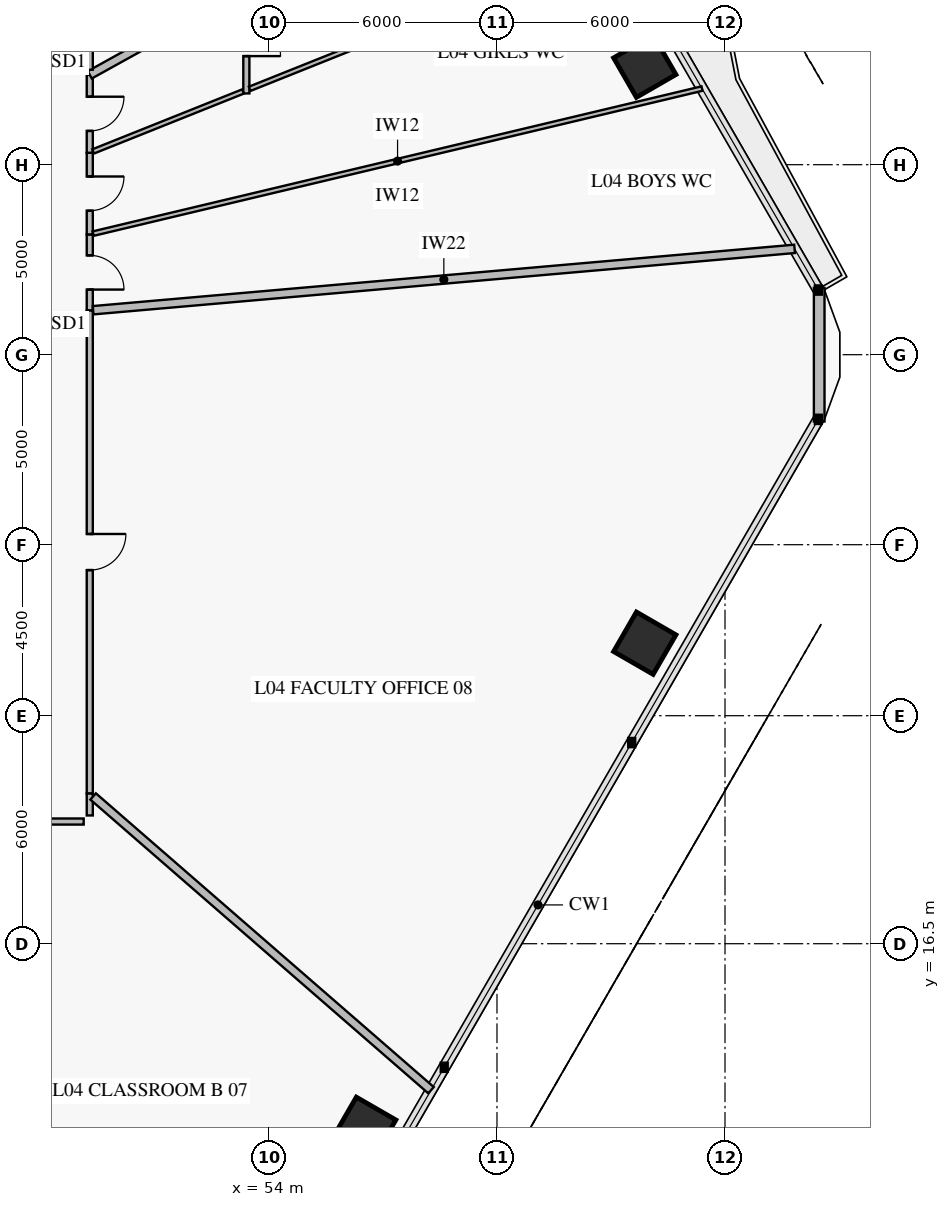
"""IFC4 building model, lengths in metres.
Left out: names, types, materials, properties, quantities, classifications, styles, units other than length and angle.
Written with IfcOpenShell. Run it as: python <this file> out.ifc"""

import sys

from ifc_helpers import new_model, si_unit, direction, frame, frame_2d, origin, origin_2d, place, context, subcontext, project, spatial, rectangle, extrude, element, fill, save


model = new_model("IFC4")
c1 = context("Model", 3, precision=1e-05, world=origin(), true_north=direction((0.0, 1.0)))
c2 = subcontext(c1, "Body", "Model", "MODEL_VIEW")
j1 = project(units=[si_unit("LENGTHUNIT", "METRE"), si_unit("PLANEANGLEUNIT", "RADIAN")], contexts=[c1])
p1 = place(None, origin())
s1 = spatial("IfcSite", under=j1, at=p1, CompositionType="ELEMENT")
p2 = place(p1, origin())
s2 = spatial("IfcBuilding", under=s1, at=p2, CompositionType="ELEMENT")
p3 = place(p2, frame((0.0, 0.0, 16.2)))
s3 = spatial("IfcBuildingStorey", under=s2, at=p3, CompositionType="ELEMENT", Elevation=16.2)
for number, where, z_axis, x_axis in (
    (1, (63.889, 39.592, 0.0), (0.0, 0.0, 1.0), (-0.5, 0.866, 0.0)),
    (2, (56.519, 11.643, 0.0), (0.0, 0.0, 1.0), (0.5, 0.866, 0.0)),
    (3, (63.889, 24.408, 0.0), (0.0, 0.0, 1.0), (0.5, 0.866, 0.0)),
):
    element("IfcColumn", number, at=place(p3, frame(where, z_axis=z_axis, x_axis=x_axis)), inside=s3, PredefinedType="COLUMN", context=c2, shape_type="SweptSolid", body=[
        extrude(rectangle(XDim=1.2, YDim=1.2, at=origin_2d()), origin(), (0.0, 0.0, 1.0), 3.92),
    ])
p4 = place(p3, frame((68.479, 33.758, 0.0), z_axis=(0.0, 0.0, 1.0), x_axis=(0.0, -1.0, 0.0)))
e4 = element("IfcWall", 4, at=p4, inside=s3, PredefinedType="SOLIDWALL", context=c2, shape_type="SweptSolid", body=[
    extrude(rectangle(XDim=3.515, YDim=0.28, at=frame_2d((1.758, 0.0))), origin(), (0.0, 0.0, 1.0), 3.92),
])
p5 = place(p3, frame((49.285, 33.162, 0.0), z_axis=(0.0, 0.0, 1.0), x_axis=(0.0, 1.0, 0.0)))
e5 = element("IfcWall", 5, at=p5, inside=s3, PredefinedType="PARTITIONING", context=c2, shape_type="SweptSolid", body=[
    extrude(rectangle(XDim=2.002, YDim=0.16, at=frame_2d((1.001, 0.0))), origin(), (0.0, 0.0, 1.0), 3.92),
])
p6 = place(p5, frame((0.551, 0.0, 0.0)))
e6 = element("IfcOpeningElement", 6, at=p6, cuts=e5, PredefinedType="OPENING", context=c2, shape_type="SweptSolid", body=[
    extrude(rectangle(XDim=0.9, YDim=2.1, at=frame_2d((0.45, 1.05))), frame((0.0, 0.092, 0.0), z_axis=(0.0, -1.0, 0.0), x_axis=(1.0, 0.0, 0.0)), (0.0, 0.0, 1.0), 0.184),
])
p7 = place(p3, frame((49.285, 35.165, 0.0), z_axis=(0.0, 0.0, 1.0), x_axis=(0.0, 1.0, 0.0)))
e7 = element("IfcWall", 7, at=p7, inside=s3, PredefinedType="PARTITIONING", context=c2, shape_type="SweptSolid", body=[
    extrude(rectangle(XDim=2.149, YDim=0.16, at=frame_2d((1.074, 0.0))), origin(), (0.0, 0.0, 1.0), 3.22),
])
p8 = place(p7, frame((0.624, 0.0, 0.0)))
e8 = element("IfcOpeningElement", 8, at=p8, cuts=e7, PredefinedType="OPENING", context=c2, shape_type="SweptSolid", body=[
    extrude(rectangle(XDim=0.9, YDim=2.1, at=frame_2d((0.45, 1.05))), frame((0.0, 0.092, 0.0), z_axis=(0.0, -1.0, 0.0), x_axis=(1.0, 0.0, 0.0)), (0.0, 0.0, 1.0), 0.184),
])
p9 = place(p3, frame((53.405, 41.739, 0.0), z_axis=(0.0, 0.0, 1.0), x_axis=(0.0, -1.0, 0.0)))
e9 = element("IfcWall", 9, at=p9, inside=s3, PredefinedType="PARTITIONING", context=c2, shape_type="SweptSolid", body=[
    extrude(rectangle(XDim=2.864, YDim=0.16, at=frame_2d((1.432, 0.0))), origin(), (0.0, 0.0, 1.0), 3.92),
])
p10 = place(p9, frame((0.982, 0.0, 0.0)))
e10 = element("IfcOpeningElement", 10, at=p10, cuts=e9, PredefinedType="OPENING", context=c2, shape_type="SweptSolid", body=[
    extrude(rectangle(XDim=0.9, YDim=2.1, at=frame_2d((0.45, 1.05))), frame((0.0, 0.092, 0.0), z_axis=(0.0, -1.0, 0.0), x_axis=(1.0, 0.0, 0.0)), (0.0, 0.0, 1.0), 0.184),
])
p11 = place(p3, frame((49.285, 37.314, 0.0), z_axis=(0.0, 0.0, 1.0), x_axis=(0.0, 1.0, 0.0)))
e11 = element("IfcWall", 11, at=p11, inside=s3, PredefinedType="PARTITIONING", context=c2, shape_type="SweptSolid", body=[
    extrude(rectangle(XDim=2.05, YDim=0.16, at=frame_2d((1.025, 0.0))), origin(), (0.0, 0.0, 1.0), 3.92),
])
p12 = place(p11, frame((0.575, 0.0, 0.0)))
e12 = element("IfcOpeningElement", 12, at=p12, cuts=e11, PredefinedType="OPENING", context=c2, shape_type="SweptSolid", body=[
    extrude(rectangle(XDim=0.9, YDim=2.1, at=frame_2d((0.45, 1.05))), frame((0.0, 0.092, 0.0), z_axis=(0.0, -1.0, 0.0), x_axis=(1.0, 0.0, 0.0)), (0.0, 0.0, 1.0), 0.184),
])
p13 = place(p3, frame((41.992, 19.715, 0.0), z_axis=(0.0, 0.0, 1.0), x_axis=(1.0, 0.0, 0.0)))
e13 = element("IfcWall", 13, at=p13, inside=s3, PredefinedType="PARTITIONING", context=c2, shape_type="SweptSolid", body=[
    extrude(rectangle(XDim=7.133, YDim=0.16, at=frame_2d((3.567, 0.0))), origin(), (0.0, 0.0, 1.0), 3.22),
])
p14 = place(p13, frame((2.992, 0.0, 0.0)))
e14 = element("IfcOpeningElement", 14, at=p14, cuts=e13, PredefinedType="OPENING", context=c2, shape_type="SweptSolid", body=[
    extrude(rectangle(XDim=1.15, YDim=2.2, at=frame_2d((0.575, 1.1))), frame((0.0, 0.092, 0.0), z_axis=(0.0, -1.0, 0.0), x_axis=(1.0, 0.0, 0.0)), (0.0, 0.0, 1.0), 0.184),
])
p15 = place(p3, frame((49.285, 20.451, 0.0), z_axis=(0.0, 0.0, 1.0), x_axis=(0.0, 1.0, 0.0)))
e15 = element("IfcWall", 15, at=p15, inside=s3, PredefinedType="PARTITIONING", context=c2, shape_type="SweptSolid", body=[
    extrude(rectangle(XDim=12.711, YDim=0.16, at=frame_2d((6.355, 0.0))), origin(), (0.0, 0.0, 1.0), 3.22),
])
p16 = place(p15, frame((5.88, 0.0, 0.0)))
e16 = element("IfcOpeningElement", 16, at=p16, cuts=e15, PredefinedType="OPENING", context=c2, shape_type="SweptSolid", body=[
    extrude(rectangle(XDim=0.95, YDim=2.1, at=frame_2d((0.475, 1.05))), frame((0.0, 0.092, 0.0), z_axis=(0.0, -1.0, 0.0), x_axis=(1.0, 0.0, 0.0)), (0.0, 0.0, 1.0), 0.184),
])
p17 = place(p3, frame((49.373, 33.17, 0.0), z_axis=(0.0, 0.0, 1.0), x_axis=(0.99619391773, 0.087164661858, 0.0)))
e17 = element("IfcWall", 17, at=p17, inside=s3, PredefinedType="PARTITIONING", context=c2, shape_type="SweptSolid", body=[
    extrude(rectangle(XDim=18.528, YDim=0.22, at=frame_2d((9.264, 0.0))), origin(), (0.0, 0.0, 1.0), 3.17),
])
p18 = place(p3, frame((49.373, 35.186, 0.0), z_axis=(0.0, 0.0, 1.0), x_axis=(0.972774396977, 0.231754120968, 0.0)))
e18 = element("IfcWall", 18, at=p18, inside=s3, PredefinedType="PARTITIONING", context=c2, shape_type="SweptSolid", body=[
    extrude(rectangle(XDim=16.471, YDim=0.12, at=frame_2d((8.235, 0.0))), origin(), (0.0, 0.0, 1.0), 3.17),
])
p19 = place(p3, frame((49.373, 37.349, 0.0), z_axis=(0.0, 0.0, 1.0), x_axis=(0.928488582268, 0.371360946517, 0.0)))
e19 = element("IfcWall", 19, at=p19, inside=s3, PredefinedType="PARTITIONING", context=c2, shape_type="SweptSolid", body=[
    extrude(rectangle(XDim=4.248, YDim=0.12, at=frame_2d((2.124, 0.0))), origin(), (0.0, 0.0, 1.0), 3.92),
])
p20 = place(p3, frame((53.493, 38.997, 0.0), z_axis=(0.0, 0.0, 1.0), x_axis=(0.928486388213, 0.371366432117, 0.0)))
e20 = element("IfcWall", 20, at=p20, inside=s3, PredefinedType="PARTITIONING", context=c2, shape_type="SweptSolid", body=[
    extrude(rectangle(XDim=10.417, YDim=0.12, at=frame_2d((5.208, 0.0))), origin(), (0.0, 0.0, 1.0), 3.17),
])
p21 = place(p3, frame((49.285, 39.364, 0.0), z_axis=(0.0, 0.0, 1.0), x_axis=(0.874606547494, 0.484833360115, 0.0)))
e21 = element("IfcWall", 21, at=p21, inside=s3, PredefinedType="PARTITIONING", context=c2, shape_type="SweptSolid", body=[
    extrude(rectangle(XDim=4.61, YDim=0.22, at=frame_2d((2.305, 0.0))), origin(), (0.0, 0.0, 1.0), 3.92),
])
p22 = place(p3, frame((49.285, 39.499, 0.0), z_axis=(0.0, 0.0, 1.0), x_axis=(0.0, 1.0, 0.0)))
e22 = element("IfcWall", 22, at=p22, inside=s3, PredefinedType="PARTITIONING", context=c2, shape_type="SweptSolid", body=[
    extrude(rectangle(XDim=4.626, YDim=0.16, at=frame_2d((2.313, 0.0))), origin(), (0.0, 0.0, 1.0), 3.92),
])
p23 = place(p3, frame((42.035, 19.627, 0.0), z_axis=(0.0, 0.0, 1.0), x_axis=(0.438375147569, -0.898792094977, 0.0)))
e23 = element("IfcWall", 23, at=p23, inside=s3, PredefinedType="PARTITIONING", context=c2, shape_type="SweptSolid", body=[
    extrude(rectangle(XDim=18.453, YDim=0.22, at=frame_2d((9.227, 0.0))), origin(), (0.0, 0.0, 1.0), 3.17),
])
p24 = place(p3, frame((49.285, 19.875, 0.0), z_axis=(0.0, 0.0, 1.0), x_axis=(0.0, 1.0, 0.0)))
e24 = element("IfcWall", 24, at=p24, inside=s3, PredefinedType="PARTITIONING", context=c2, shape_type="SweptSolid", body=[
    extrude(rectangle(XDim=0.576, YDim=0.16, at=frame_2d((0.288, 0.0))), origin(), (0.0, 0.0, 1.0), 3.92),
])
p25 = place(p3, frame((49.373, 20.375, 0.0), z_axis=(0.0, 0.0, 1.0), x_axis=(0.754715261602, -0.656052493254, 0.0)))
e25 = element("IfcWall", 25, at=p25, inside=s3, PredefinedType="PARTITIONING", context=c2, shape_type="SweptSolid", body=[
    extrude(rectangle(XDim=11.781, YDim=0.22, at=frame_2d((5.891, 0.0))), origin(), (0.0, 0.0, 1.0), 3.17),
])
p26 = place(p6, frame((0.9, 0.0, 0.0), z_axis=(0.0, 0.0, 1.0), x_axis=(-1.0, 0.0, 0.0)))
e26 = element("IfcDoor", 26, at=p26, inside=s3, OperationType="SINGLE_SWING_RIGHT", PredefinedType="DOOR", context=c2, shape_type="SweptSolid", body=[
    extrude(rectangle(XDim=0.9, YDim=2.1, at=frame_2d((0.45, 1.05))), frame((0.0, 0.025, 0.0), z_axis=(0.0, -1.0, 0.0), x_axis=(1.0, 0.0, 0.0)), (0.0, 0.0, 1.0), 0.05),
])
fill(e6, e26)
p27 = place(p8, frame((0.9, 0.0, 0.0), z_axis=(0.0, 0.0, 1.0), x_axis=(-1.0, 0.0, 0.0)))
e27 = element("IfcDoor", 27, at=p27, inside=s3, OperationType="SINGLE_SWING_LEFT", PredefinedType="DOOR", context=c2, shape_type="SweptSolid", body=[
    extrude(rectangle(XDim=0.9, YDim=2.1, at=frame_2d((0.45, 1.05))), frame((0.0, 0.025, 0.0), z_axis=(0.0, -1.0, 0.0), x_axis=(1.0, 0.0, 0.0)), (0.0, 0.0, 1.0), 0.05),
])
fill(e8, e27)
p28 = place(p10, origin())
e28 = element("IfcDoor", 28, at=p28, inside=s3, OperationType="SINGLE_SWING_RIGHT", PredefinedType="DOOR", context=c2, shape_type="SweptSolid", body=[
    extrude(rectangle(XDim=0.9, YDim=2.1, at=frame_2d((0.45, 1.05))), frame((0.0, 0.025, 0.0), z_axis=(0.0, -1.0, 0.0), x_axis=(1.0, 0.0, 0.0)), (0.0, 0.0, 1.0), 0.05),
])
fill(e10, e28)
p29 = place(p12, frame((0.9, 0.0, 0.0), z_axis=(0.0, 0.0, 1.0), x_axis=(-1.0, 0.0, 0.0)))
e29 = element("IfcDoor", 29, at=p29, inside=s3, OperationType="SINGLE_SWING_LEFT", PredefinedType="DOOR", context=c2, shape_type="SweptSolid", body=[
    extrude(rectangle(XDim=0.9, YDim=2.1, at=frame_2d((0.45, 1.05))), frame((0.0, 0.025, 0.0), z_axis=(0.0, -1.0, 0.0), x_axis=(1.0, 0.0, 0.0)), (0.0, 0.0, 1.0), 0.05),
])
fill(e12, e29)
p30 = place(p16, frame((0.95, 0.0, 0.0), z_axis=(0.0, 0.0, 1.0), x_axis=(-1.0, 0.0, 0.0)))
e30 = element("IfcDoor", 30, at=p30, inside=s3, OperationType="SINGLE_SWING_LEFT", PredefinedType="DOOR", context=c2, shape_type="SweptSolid", body=[
    extrude(rectangle(XDim=0.95, YDim=2.1, at=frame_2d((0.475, 1.05))), frame((0.0, 0.025, 0.0), z_axis=(0.0, -1.0, 0.0), x_axis=(1.0, 0.0, 0.0)), (0.0, 0.0, 1.0), 0.05),
])
fill(e16, e30)
save(model, sys.argv[1])
